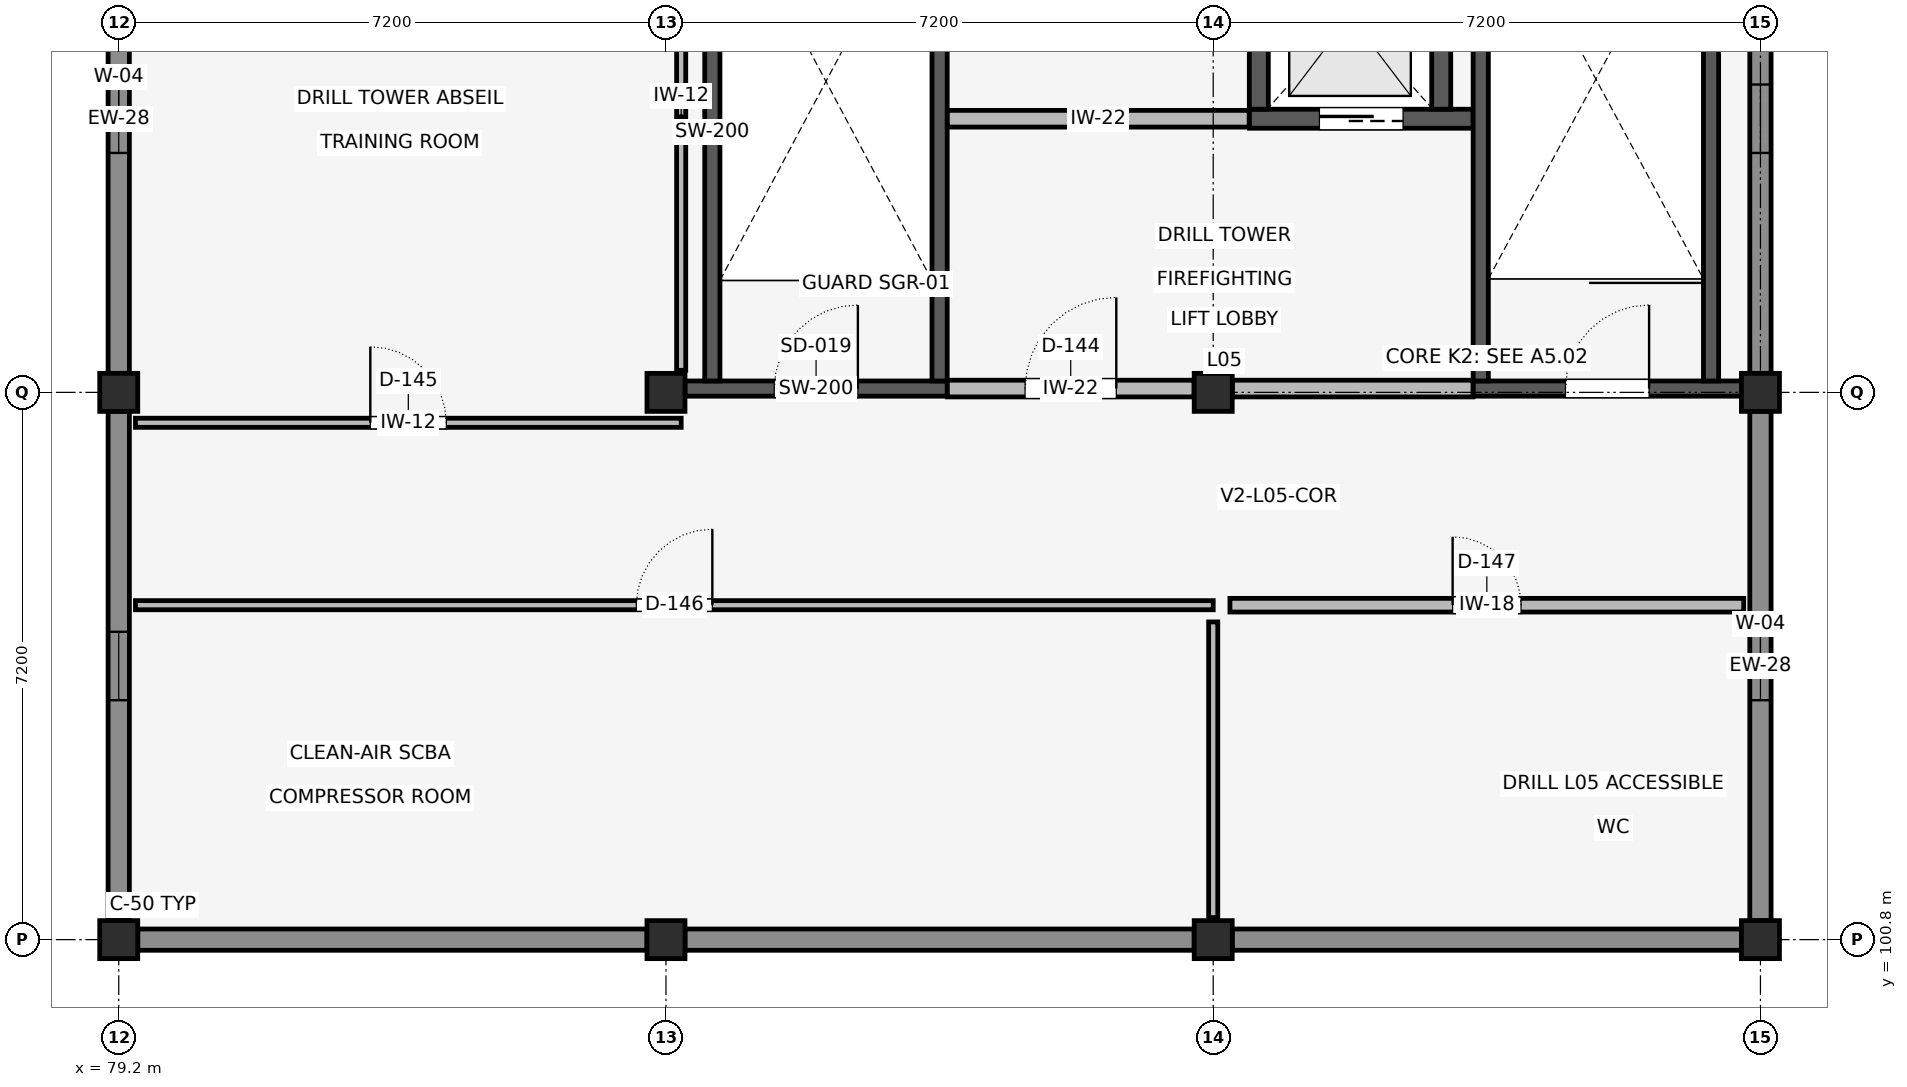
"""IFC4 building model, lengths in metres.
Left out: names, types, materials, properties, quantities, classifications, styles, units other than length and angle.
Written with IfcOpenShell. Run it as: python <this file> out.ifc"""

import sys

from ifc_helpers import new_model, si_unit, direction, frame, frame_2d, origin, origin_2d, place, context, subcontext, project, spatial, rectangle, extrude, element, fill, save


model = new_model("IFC4")
c1 = context("Model", 3, precision=1e-05, world=origin(), true_north=direction((0.0, 1.0)))
c2 = subcontext(c1, "Body", "Model", "MODEL_VIEW")
j1 = project(units=[si_unit("LENGTHUNIT", "METRE"), si_unit("PLANEANGLEUNIT", "RADIAN")], contexts=[c1])
p1 = place(None, origin())
s1 = spatial("IfcSite", under=j1, at=p1, CompositionType="ELEMENT")
p2 = place(p1, origin())
s2 = spatial("IfcBuilding", under=s1, at=p2, CompositionType="ELEMENT")
p3 = place(p2, frame((0.0, 0.0, 21.3)))
s3 = spatial("IfcBuildingStorey", under=s2, at=p3, CompositionType="ELEMENT", Elevation=21.3)
for number, where, z_axis, x_axis in (
    (1, (79.2, 100.8, 0.0), (0.0, 0.0, 1.0), (1.0, 0.0, 0.0)),
    (2, (79.2, 108.0, 0.0), (0.0, 0.0, 1.0), (1.0, 0.0, 0.0)),
    (3, (86.4, 100.8, 0.0), (0.0, 0.0, 1.0), (1.0, 0.0, 0.0)),
    (4, (86.4, 108.0, 0.0), (0.0, 0.0, 1.0), (1.0, 0.0, 0.0)),
    (5, (93.6, 100.8, 0.0), (0.0, 0.0, 1.0), (1.0, 0.0, 0.0)),
    (6, (93.6, 108.0, 0.0), (0.0, 0.0, 1.0), (1.0, 0.0, 0.0)),
    (7, (100.8, 100.8, 0.0), (0.0, 0.0, 1.0), (1.0, 0.0, 0.0)),
    (8, (100.8, 108.0, 0.0), (0.0, 0.0, 1.0), (1.0, 0.0, 0.0)),
):
    element("IfcColumn", number, at=place(p3, frame(where, z_axis=z_axis, x_axis=x_axis)), inside=s3, PredefinedType="COLUMN", context=c2, shape_type="SweptSolid", body=[
        extrude(rectangle(XDim=0.5, YDim=0.5, at=origin_2d()), origin(), (0.0, 0.0, 1.0), 3.9),
    ])
p4 = place(p3, frame((94.075, 111.6, 0.0), z_axis=(0.0, 0.0, 1.0), x_axis=(1.0, 0.0, 0.0)))
e9 = element("IfcWall", 9, at=p4, inside=s3, PredefinedType="SHEAR", context=c2, shape_type="SweptSolid", body=[
    extrude(rectangle(XDim=2.945, YDim=0.25, at=frame_2d((1.473, 0.0))), origin(), (0.0, 0.0, 1.0), 3.65),
])
p5 = place(p4, frame((0.923, 0.0, 0.0)))
e10 = element("IfcOpeningElement", 10, at=p5, cuts=e9, PredefinedType="OPENING", context=c2, shape_type="SweptSolid", body=[
    extrude(rectangle(XDim=1.1, YDim=2.15, at=frame_2d((0.55, 1.075))), frame((0.0, 0.137, 0.0), z_axis=(0.0, -1.0, 0.0), x_axis=(1.0, 0.0, 0.0)), (0.0, 0.0, 1.0), 0.274),
])
for number, where, z_axis, x_axis in (
    (11, (94.2, 111.725, 0.0), (0.0, 0.0, 1.0), (0.0, 1.0, 0.0)),
    (12, (96.6, 111.725, 0.0), (0.0, 0.0, 1.0), (0.0, 1.0, 0.0)),
):
    element("IfcWall", number, at=place(p3, frame(where, z_axis=z_axis, x_axis=x_axis)), inside=s3, PredefinedType="SHEAR", context=c2, shape_type="SweptSolid", body=[
        extrude(rectangle(XDim=2.45, YDim=0.25, at=frame_2d((1.225, 0.0))), origin(), (0.0, 0.0, 1.0), 3.65),
    ])
p6 = place(p3, frame((97.02, 108.05, 0.0), z_axis=(0.0, 0.0, 1.0), x_axis=(1.0, 0.0, 0.0)))
e13 = element("IfcWall", 13, at=p6, inside=s3, PredefinedType="SHEAR", context=c2, shape_type="SweptSolid", body=[
    extrude(rectangle(XDim=3.53, YDim=0.2, at=frame_2d((1.765, 0.0))), origin(), (0.0, 0.0, 1.0), 3.65),
])
p7 = place(p6, frame((1.215, 0.0, 0.0)))
e14 = element("IfcOpeningElement", 14, at=p7, cuts=e13, PredefinedType="OPENING", context=c2, shape_type="SweptSolid", body=[
    extrude(rectangle(XDim=1.1, YDim=2.15, at=frame_2d((0.55, 1.075))), frame((0.0, 0.112, 0.0), z_axis=(0.0, -1.0, 0.0), x_axis=(1.0, 0.0, 0.0)), (0.0, 0.0, 1.0), 0.224),
])
for number, where, z_axis, x_axis in (
    (15, (97.12, 108.15, 0.0), (0.0, 0.0, 1.0), (0.0, 1.0, 0.0)),
    (16, (100.15, 108.15, 0.0), (0.0, 0.0, 1.0), (0.0, 1.0, 0.0)),
):
    element("IfcWall", number, at=place(p3, frame(where, z_axis=z_axis, x_axis=x_axis)), inside=s3, PredefinedType="SHEAR", context=c2, shape_type="SweptSolid", body=[
        extrude(rectangle(XDim=6.6, YDim=0.2, at=frame_2d((3.3, 0.0))), origin(), (0.0, 0.0, 1.0), 3.65),
    ])
p8 = place(p3, frame((86.65, 108.05, 0.0), z_axis=(0.0, 0.0, 1.0), x_axis=(1.0, 0.0, 0.0)))
e17 = element("IfcWall", 17, at=p8, inside=s3, PredefinedType="SHEAR", context=c2, shape_type="SweptSolid", body=[
    extrude(rectangle(XDim=3.45, YDim=0.2, at=frame_2d((1.725, 0.0))), origin(), (0.0, 0.0, 1.0), 3.65),
])
p9 = place(p8, frame((1.175, 0.0, 0.0)))
e18 = element("IfcOpeningElement", 18, at=p9, cuts=e17, PredefinedType="OPENING", context=c2, shape_type="SweptSolid", body=[
    extrude(rectangle(XDim=1.1, YDim=2.15, at=frame_2d((0.55, 1.075))), frame((0.0, 0.112, 0.0), z_axis=(0.0, -1.0, 0.0), x_axis=(1.0, 0.0, 0.0)), (0.0, 0.0, 1.0), 0.224),
])
for number, where, z_axis, x_axis in (
    (19, (87.01, 108.15, 0.0), (0.0, 0.0, 1.0), (0.0, 1.0, 0.0)),
    (20, (90.0, 108.15, 0.0), (0.0, 0.0, 1.0), (0.0, 1.0, 0.0)),
):
    element("IfcWall", number, at=place(p3, frame(where, z_axis=z_axis, x_axis=x_axis)), inside=s3, PredefinedType="SHEAR", context=c2, shape_type="SweptSolid", body=[
        extrude(rectangle(XDim=6.56, YDim=0.2, at=frame_2d((3.28, 0.0))), origin(), (0.0, 0.0, 1.0), 3.65),
    ])
p10 = place(p3, frame((100.8, 101.05, 0.0), z_axis=(0.0, 0.0, 1.0), x_axis=(0.0, 1.0, 0.0)))
e21 = element("IfcWall", 21, at=p10, inside=s3, PredefinedType="ELEMENTEDWALL", context=c2, shape_type="SweptSolid", body=[
    extrude(rectangle(XDim=6.7, YDim=0.28, at=frame_2d((3.35, 0.0))), origin(), (0.0, 0.0, 1.0), 3.04),
])
p11 = place(p10, frame((2.9, 0.0, 0.85)))
e22 = element("IfcOpeningElement", 22, at=p11, cuts=e21, PredefinedType="OPENING", context=c2, shape_type="SweptSolid", body=[
    extrude(rectangle(XDim=0.9, YDim=2.0, at=frame_2d((0.45, 1.0))), frame((0.0, 0.152, 0.0), z_axis=(0.0, -1.0, 0.0), x_axis=(1.0, 0.0, 0.0)), (0.0, 0.0, 1.0), 0.304),
])
p12 = place(p3, frame((100.8, 108.25, 0.0), z_axis=(0.0, 0.0, 1.0), x_axis=(0.0, 1.0, 0.0)))
e23 = element("IfcWall", 23, at=p12, inside=s3, PredefinedType="ELEMENTEDWALL", context=c2, shape_type="SweptSolid", body=[
    extrude(rectangle(XDim=6.7, YDim=0.28, at=frame_2d((3.35, 0.0))), origin(), (0.0, 0.0, 1.0), 2.99),
])
p13 = place(p12, frame((2.9, 0.0, 0.8)))
e24 = element("IfcOpeningElement", 24, at=p13, cuts=e23, PredefinedType="OPENING", context=c2, shape_type="SweptSolid", body=[
    extrude(rectangle(XDim=0.9, YDim=2.0, at=frame_2d((0.45, 1.0))), frame((0.0, 0.152, 0.0), z_axis=(0.0, -1.0, 0.0), x_axis=(1.0, 0.0, 0.0)), (0.0, 0.0, 1.0), 0.304),
])
p14 = place(p3, frame((79.2, 114.95, 0.0), z_axis=(0.0, 0.0, 1.0), x_axis=(0.0, -1.0, 0.0)))
e25 = element("IfcWall", 25, at=p14, inside=s3, PredefinedType="ELEMENTEDWALL", context=c2, shape_type="SweptSolid", body=[
    extrude(rectangle(XDim=6.7, YDim=0.28, at=frame_2d((3.35, 0.0))), origin(), (0.0, 0.0, 1.0), 2.99),
])
p15 = place(p14, frame((2.9, 0.0, 0.8)))
e26 = element("IfcOpeningElement", 26, at=p15, cuts=e25, PredefinedType="OPENING", context=c2, shape_type="SweptSolid", body=[
    extrude(rectangle(XDim=0.9, YDim=2.0, at=frame_2d((0.45, 1.0))), frame((0.0, 0.152, 0.0), z_axis=(0.0, -1.0, 0.0), x_axis=(1.0, 0.0, 0.0)), (0.0, 0.0, 1.0), 0.304),
])
p16 = place(p3, frame((79.2, 107.75, 0.0), z_axis=(0.0, 0.0, 1.0), x_axis=(0.0, -1.0, 0.0)))
e27 = element("IfcWall", 27, at=p16, inside=s3, PredefinedType="ELEMENTEDWALL", context=c2, shape_type="SweptSolid", body=[
    extrude(rectangle(XDim=6.7, YDim=0.28, at=frame_2d((3.35, 0.0))), origin(), (0.0, 0.0, 1.0), 3.04),
])
p17 = place(p16, frame((2.9, 0.0, 0.8)))
e28 = element("IfcOpeningElement", 28, at=p17, cuts=e27, PredefinedType="OPENING", context=c2, shape_type="SweptSolid", body=[
    extrude(rectangle(XDim=0.9, YDim=2.0, at=frame_2d((0.45, 1.0))), frame((0.0, 0.152, 0.0), z_axis=(0.0, -1.0, 0.0), x_axis=(1.0, 0.0, 0.0)), (0.0, 0.0, 1.0), 0.304),
])
p18 = place(p3, frame((79.45, 100.8, 0.0), z_axis=(0.0, 0.0, 1.0), x_axis=(1.0, 0.0, 0.0)))
e29 = element("IfcWall", 29, at=p18, inside=s3, PredefinedType="ELEMENTEDWALL", context=c2, shape_type="SweptSolid", body=[
    extrude(rectangle(XDim=6.7, YDim=0.28, at=frame_2d((3.35, 0.0))), origin(), (0.0, 0.0, 1.0), 2.89),
])
p19 = place(p3, frame((86.65, 100.8, 0.0), z_axis=(0.0, 0.0, 1.0), x_axis=(1.0, 0.0, 0.0)))
e30 = element("IfcWall", 30, at=p19, inside=s3, PredefinedType="ELEMENTEDWALL", context=c2, shape_type="SweptSolid", body=[
    extrude(rectangle(XDim=6.7, YDim=0.28, at=frame_2d((3.35, 0.0))), origin(), (0.0, 0.0, 1.0), 2.94),
])
p20 = place(p3, frame((93.85, 100.8, 0.0), z_axis=(0.0, 0.0, 1.0), x_axis=(1.0, 0.0, 0.0)))
e31 = element("IfcWall", 31, at=p20, inside=s3, PredefinedType="ELEMENTEDWALL", context=c2, shape_type="SweptSolid", body=[
    extrude(rectangle(XDim=6.7, YDim=0.28, at=frame_2d((3.35, 0.0))), origin(), (0.0, 0.0, 1.0), 2.89),
])
p21 = place(p3, frame((90.102, 108.05, 0.0), z_axis=(0.0, 0.0, 1.0), x_axis=(1.0, 0.0, 0.0)))
e32 = element("IfcWall", 32, at=p21, inside=s3, PredefinedType="STANDARD", context=c2, shape_type="SweptSolid", body=[
    extrude(rectangle(XDim=3.246, YDim=0.22, at=frame_2d((1.623, 0.0))), origin(), (0.0, 0.0, 1.0), 3.62),
])
p22 = place(p21, frame((1.023, 0.0, 0.0)))
e33 = element("IfcOpeningElement", 33, at=p22, cuts=e32, PredefinedType="OPENING", context=c2, shape_type="SweptSolid", body=[
    extrude(rectangle(XDim=1.2, YDim=2.2, at=frame_2d((0.6, 1.1))), frame((0.0, 0.122, 0.0), z_axis=(0.0, -1.0, 0.0), x_axis=(1.0, 0.0, 0.0)), (0.0, 0.0, 1.0), 0.244),
])
p23 = place(p3, frame((93.852, 108.05, 0.0), z_axis=(0.0, 0.0, 1.0), x_axis=(1.0, 0.0, 0.0)))
e34 = element("IfcWall", 34, at=p23, inside=s3, PredefinedType="STANDARD", context=c2, shape_type="SweptSolid", body=[
    extrude(rectangle(XDim=3.166, YDim=0.22, at=frame_2d((1.583, 0.0))), origin(), (0.0, 0.0, 1.0), 3.62),
])
p24 = place(p3, frame((90.102, 111.6, 0.0), z_axis=(0.0, 0.0, 1.0), x_axis=(1.0, 0.0, 0.0)))
e35 = element("IfcWall", 35, at=p24, inside=s3, PredefinedType="STANDARD", context=c2, shape_type="SweptSolid", body=[
    extrude(rectangle(XDim=3.971, YDim=0.22, at=frame_2d((1.985, 0.0))), origin(), (0.0, 0.0, 1.0), 2.988),
])
p25 = place(p3, frame((79.42, 107.6, 0.0), z_axis=(0.0, 0.0, 1.0), x_axis=(1.0, 0.0, 0.0)))
e36 = element("IfcWall", 36, at=p25, inside=s3, PredefinedType="PARTITIONING", context=c2, shape_type="SweptSolid", body=[
    extrude(rectangle(XDim=7.18, YDim=0.12, at=frame_2d((3.59, 0.0))), origin(), (0.0, 0.0, 1.0), 3.038),
])
p26 = place(p25, frame((3.09, 0.0, 0.0)))
e37 = element("IfcOpeningElement", 37, at=p26, cuts=e36, PredefinedType="OPENING", context=c2, shape_type="SweptSolid", body=[
    extrude(rectangle(XDim=1.0, YDim=2.15, at=frame_2d((0.5, 1.075))), frame((0.0, 0.072, 0.0), z_axis=(0.0, -1.0, 0.0), x_axis=(1.0, 0.0, 0.0)), (0.0, 0.0, 1.0), 0.144),
])
p27 = place(p3, frame((86.6, 108.29, 0.0), z_axis=(0.0, 0.0, 1.0), x_axis=(0.0, 1.0, 0.0)))
e38 = element("IfcWall", 38, at=p27, inside=s3, PredefinedType="PARTITIONING", context=c2, shape_type="SweptSolid", body=[
    extrude(rectangle(XDim=6.62, YDim=0.12, at=frame_2d((3.31, 0.0))), origin(), (0.0, 0.0, 1.0), 2.988),
])
p28 = place(p3, frame((79.42, 105.2, 0.0), z_axis=(0.0, 0.0, 1.0), x_axis=(1.0, 0.0, 0.0)))
e39 = element("IfcWall", 39, at=p28, inside=s3, PredefinedType="PARTITIONING", context=c2, shape_type="SweptSolid", body=[
    extrude(rectangle(XDim=14.18, YDim=0.12, at=frame_2d((7.09, 0.0))), origin(), (0.0, 0.0, 1.0), 3.038),
])
p29 = place(p28, frame((6.59, 0.0, 0.0)))
e40 = element("IfcOpeningElement", 40, at=p29, cuts=e39, PredefinedType="OPENING", context=c2, shape_type="SweptSolid", body=[
    extrude(rectangle(XDim=1.0, YDim=2.15, at=frame_2d((0.5, 1.075))), frame((0.0, 0.072, 0.0), z_axis=(0.0, -1.0, 0.0), x_axis=(1.0, 0.0, 0.0)), (0.0, 0.0, 1.0), 0.144),
])
p30 = place(p3, frame((93.6, 101.09, 0.0), z_axis=(0.0, 0.0, 1.0), x_axis=(0.0, 1.0, 0.0)))
e41 = element("IfcWall", 41, at=p30, inside=s3, PredefinedType="PARTITIONING", context=c2, shape_type="SweptSolid", body=[
    extrude(rectangle(XDim=3.89, YDim=0.12, at=frame_2d((1.945, 0.0))), origin(), (0.0, 0.0, 1.0), 3.038),
])
p31 = place(p3, frame((93.82, 105.2, 0.0), z_axis=(0.0, 0.0, 1.0), x_axis=(1.0, 0.0, 0.0)))
e42 = element("IfcWall", 42, at=p31, inside=s3, PredefinedType="PLUMBINGWALL", context=c2, shape_type="SweptSolid", body=[
    extrude(rectangle(XDim=6.76, YDim=0.18, at=frame_2d((3.38, 0.0))), origin(), (0.0, 0.0, 1.0), 3.62),
])
p32 = place(p31, frame((2.93, 0.0, 0.0)))
e43 = element("IfcOpeningElement", 43, at=p32, cuts=e42, PredefinedType="OPENING", context=c2, shape_type="SweptSolid", body=[
    extrude(rectangle(XDim=0.9, YDim=2.1, at=frame_2d((0.45, 1.05))), frame((0.0, 0.102, 0.0), z_axis=(0.0, -1.0, 0.0), x_axis=(1.0, 0.0, 0.0)), (0.0, 0.0, 1.0), 0.204),
])
p33 = place(p11, origin())
e44 = element("IfcWindow", 44, at=p33, inside=s3, PartitioningType="SINGLE_PANEL", PredefinedType="WINDOW", context=c2, shape_type="SweptSolid", body=[
    extrude(rectangle(XDim=0.9, YDim=2.0, at=frame_2d((0.45, 1.0))), frame((0.0, 0.03, 0.0), z_axis=(0.0, -1.0, 0.0), x_axis=(1.0, 0.0, 0.0)), (0.0, 0.0, 1.0), 0.06),
])
fill(e22, e44)
p34 = place(p13, origin())
e45 = element("IfcWindow", 45, at=p34, inside=s3, PartitioningType="SINGLE_PANEL", PredefinedType="WINDOW", context=c2, shape_type="SweptSolid", body=[
    extrude(rectangle(XDim=0.9, YDim=2.0, at=frame_2d((0.45, 1.0))), frame((0.0, 0.03, 0.0), z_axis=(0.0, -1.0, 0.0), x_axis=(1.0, 0.0, 0.0)), (0.0, 0.0, 1.0), 0.06),
])
fill(e24, e45)
p35 = place(p15, origin())
e46 = element("IfcWindow", 46, at=p35, inside=s3, PartitioningType="SINGLE_PANEL", PredefinedType="WINDOW", context=c2, shape_type="SweptSolid", body=[
    extrude(rectangle(XDim=0.9, YDim=2.0, at=frame_2d((0.45, 1.0))), frame((0.0, 0.03, 0.0), z_axis=(0.0, -1.0, 0.0), x_axis=(1.0, 0.0, 0.0)), (0.0, 0.0, 1.0), 0.06),
])
fill(e26, e46)
p36 = place(p17, origin())
e47 = element("IfcWindow", 47, at=p36, inside=s3, PartitioningType="SINGLE_PANEL", PredefinedType="WINDOW", context=c2, shape_type="SweptSolid", body=[
    extrude(rectangle(XDim=0.9, YDim=2.0, at=frame_2d((0.45, 1.0))), frame((0.0, 0.03, 0.0), z_axis=(0.0, -1.0, 0.0), x_axis=(1.0, 0.0, 0.0)), (0.0, 0.0, 1.0), 0.06),
])
fill(e28, e47)
p37 = place(p7, origin())
e48 = element("IfcDoor", 48, at=p37, inside=s3, OperationType="SINGLE_SWING_RIGHT", PredefinedType="DOOR", context=c2, shape_type="SweptSolid", body=[
    extrude(rectangle(XDim=1.1, YDim=2.15, at=frame_2d((0.55, 1.075))), frame((0.0, 0.025, 0.0), z_axis=(0.0, -1.0, 0.0), x_axis=(1.0, 0.0, 0.0)), (0.0, 0.0, 1.0), 0.05),
])
fill(e14, e48)
p38 = place(p9, origin())
e49 = element("IfcDoor", 49, at=p38, inside=s3, OperationType="SINGLE_SWING_RIGHT", PredefinedType="DOOR", context=c2, shape_type="SweptSolid", body=[
    extrude(rectangle(XDim=1.1, YDim=2.15, at=frame_2d((0.55, 1.075))), frame((0.0, 0.025, 0.0), z_axis=(0.0, -1.0, 0.0), x_axis=(1.0, 0.0, 0.0)), (0.0, 0.0, 1.0), 0.05),
])
fill(e18, e49)
p39 = place(p5, origin())
e50 = element("IfcDoor", 50, at=p39, inside=s3, OperationType="SLIDING_TO_LEFT", PredefinedType="DOOR", context=c2, shape_type="SweptSolid", body=[
    extrude(rectangle(XDim=1.1, YDim=2.15, at=frame_2d((0.55, 1.075))), frame((0.0, 0.025, 0.0), z_axis=(0.0, -1.0, 0.0), x_axis=(1.0, 0.0, 0.0)), (0.0, 0.0, 1.0), 0.05),
])
fill(e10, e50)
p40 = place(p22, origin())
e51 = element("IfcDoor", 51, at=p40, inside=s3, OperationType="SINGLE_SWING_RIGHT", PredefinedType="DOOR", context=c2, shape_type="SweptSolid", body=[
    extrude(rectangle(XDim=1.2, YDim=2.2, at=frame_2d((0.6, 1.1))), frame((0.0, 0.025, 0.0), z_axis=(0.0, -1.0, 0.0), x_axis=(1.0, 0.0, 0.0)), (0.0, 0.0, 1.0), 0.05),
])
fill(e33, e51)
p41 = place(p26, origin())
e52 = element("IfcDoor", 52, at=p41, inside=s3, OperationType="SINGLE_SWING_LEFT", PredefinedType="DOOR", context=c2, shape_type="SweptSolid", body=[
    extrude(rectangle(XDim=1.0, YDim=2.15, at=frame_2d((0.5, 1.075))), frame((0.0, 0.025, 0.0), z_axis=(0.0, -1.0, 0.0), x_axis=(1.0, 0.0, 0.0)), (0.0, 0.0, 1.0), 0.05),
])
fill(e37, e52)
p42 = place(p29, origin())
e53 = element("IfcDoor", 53, at=p42, inside=s3, OperationType="SINGLE_SWING_RIGHT", PredefinedType="DOOR", context=c2, shape_type="SweptSolid", body=[
    extrude(rectangle(XDim=1.0, YDim=2.15, at=frame_2d((0.5, 1.075))), frame((0.0, 0.025, 0.0), z_axis=(0.0, -1.0, 0.0), x_axis=(1.0, 0.0, 0.0)), (0.0, 0.0, 1.0), 0.05),
])
fill(e40, e53)
p43 = place(p32, origin())
e54 = element("IfcDoor", 54, at=p43, inside=s3, OperationType="SINGLE_SWING_LEFT", PredefinedType="DOOR", context=c2, shape_type="SweptSolid", body=[
    extrude(rectangle(XDim=0.9, YDim=2.1, at=frame_2d((0.45, 1.05))), frame((0.0, 0.025, 0.0), z_axis=(0.0, -1.0, 0.0), x_axis=(1.0, 0.0, 0.0)), (0.0, 0.0, 1.0), 0.05),
])
fill(e43, e54)
save(model, sys.argv[1])
